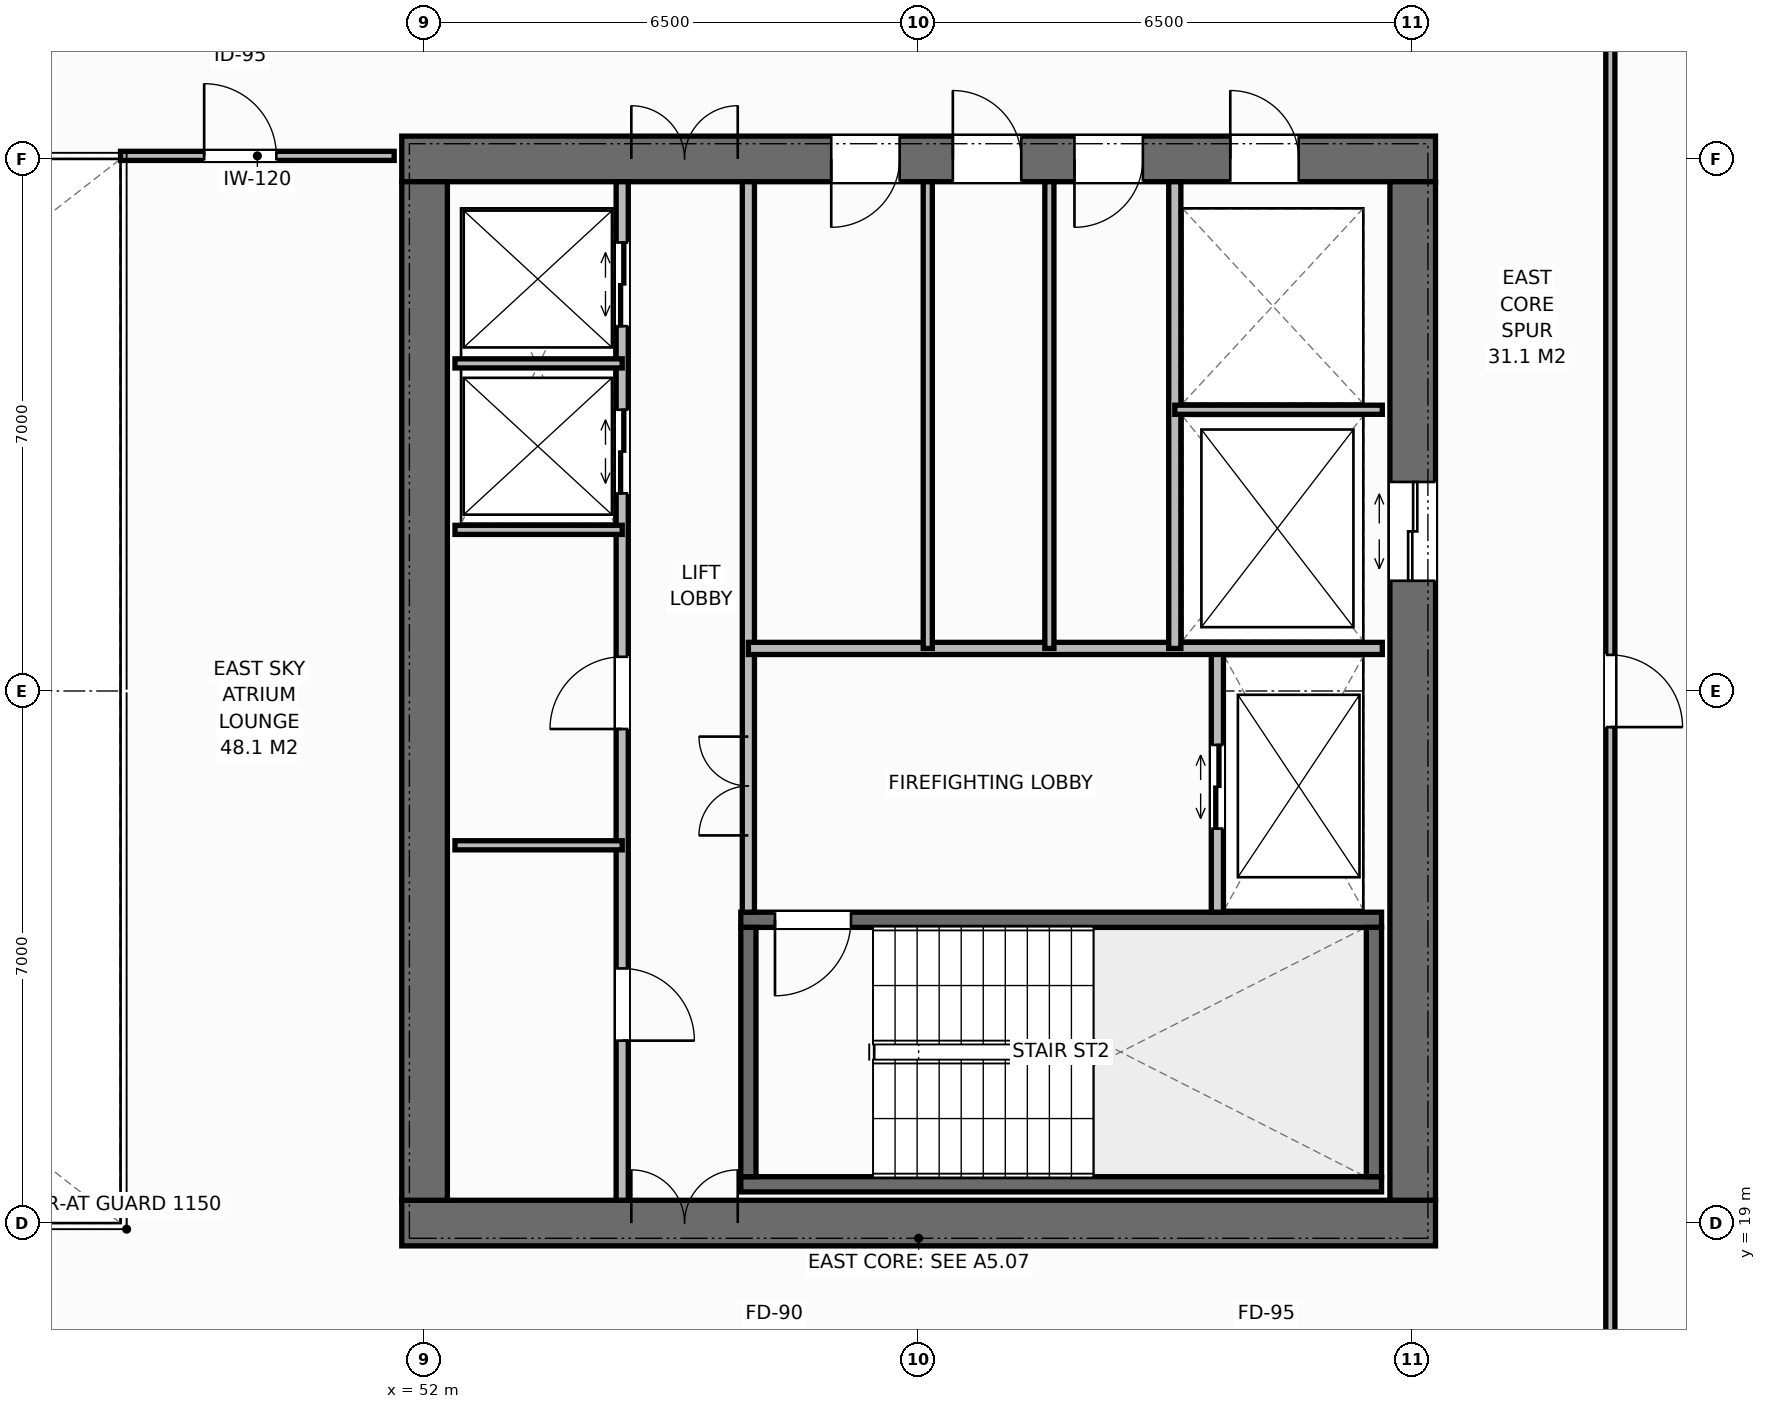
"""IFC4 building model, lengths in metres.
Left out: names, types, materials, properties, quantities, classifications, styles, units other than length and angle.
Written with IfcOpenShell. Run it as: python <this file> out.ifc"""

import sys

from ifc_helpers import new_model, si_unit, direction, frame, frame_2d, origin, place, context, subcontext, project, spatial, rectangle, extrude, element, fill, save


model = new_model("IFC4")
c1 = context("Model", 3, precision=1e-05, world=origin(), true_north=direction((0.0, 1.0)))
c2 = subcontext(c1, "Body", "Model", "MODEL_VIEW")
j1 = project(units=[si_unit("LENGTHUNIT", "METRE"), si_unit("PLANEANGLEUNIT", "RADIAN")], contexts=[c1])
p1 = place(None, origin())
s1 = spatial("IfcSite", under=j1, at=p1, CompositionType="ELEMENT")
p2 = place(p1, origin())
s2 = spatial("IfcBuilding", under=s1, at=p2, CompositionType="ELEMENT")
p3 = place(p2, frame((0.0, 0.0, 174.6)))
s3 = spatial("IfcBuildingStorey", under=s2, at=p3, CompositionType="ELEMENT", Elevation=174.6)
p4 = place(p3, frame((51.7, 19.0, 0.0), z_axis=(0.0, 0.0, 1.0), x_axis=(1.0, 0.0, 0.0)))
e1 = element("IfcWall", 1, at=p4, inside=s3, PredefinedType="SHEAR", context=c2, shape_type="SweptSolid", body=[
    extrude(rectangle(XDim=13.6, YDim=0.6, at=frame_2d((6.8, 0.0))), origin(), (0.0, 0.0, 1.0), 3.8),
])
p5 = place(p4, frame((3.02, 0.0, 0.0)))
e2 = element("IfcOpeningElement", 2, at=p5, cuts=e1, PredefinedType="OPENING", context=c2, shape_type="SweptSolid", body=[
    extrude(rectangle(XDim=1.4, YDim=2.2, at=frame_2d((0.7, 1.1))), frame((0.0, 0.31, 0.0), z_axis=(0.0, -1.0, 0.0), x_axis=(1.0, 0.0, 0.0)), (0.0, 0.0, 1.0), 0.62),
])
p6 = place(p3, frame((51.7, 33.0, 0.0), z_axis=(0.0, 0.0, 1.0), x_axis=(1.0, 0.0, 0.0)))
e3 = element("IfcWall", 3, at=p6, inside=s3, PredefinedType="SHEAR", context=c2, shape_type="SweptSolid", body=[
    extrude(rectangle(XDim=13.6, YDim=0.6, at=frame_2d((6.8, 0.0))), origin(), (0.0, 0.0, 1.0), 3.8),
])
p7 = place(p6, frame((3.02, 0.0, 0.0)))
e4 = element("IfcOpeningElement", 4, at=p7, cuts=e3, PredefinedType="OPENING", context=c2, shape_type="SweptSolid", body=[
    extrude(rectangle(XDim=1.4, YDim=2.2, at=frame_2d((0.7, 1.1))), frame((0.0, 0.31, 0.0), z_axis=(0.0, -1.0, 0.0), x_axis=(1.0, 0.0, 0.0)), (0.0, 0.0, 1.0), 0.62),
])
p8 = place(p6, frame((10.9, 0.0, 0.0)))
e5 = element("IfcOpeningElement", 5, at=p8, cuts=e3, PredefinedType="OPENING", context=c2, shape_type="SweptSolid", body=[
    extrude(rectangle(XDim=0.9, YDim=2.15, at=frame_2d((0.45, 1.075))), frame((0.0, 0.31, 0.0), z_axis=(0.0, -1.0, 0.0), x_axis=(1.0, 0.0, 0.0)), (0.0, 0.0, 1.0), 0.62),
])
p9 = place(p6, frame((5.65, 0.0, 0.0)))
e6 = element("IfcOpeningElement", 6, at=p9, cuts=e3, PredefinedType="OPENING", context=c2, shape_type="SweptSolid", body=[
    extrude(rectangle(XDim=0.9, YDim=2.15, at=frame_2d((0.45, 1.075))), frame((0.0, 0.31, 0.0), z_axis=(0.0, -1.0, 0.0), x_axis=(1.0, 0.0, 0.0)), (0.0, 0.0, 1.0), 0.62),
])
p10 = place(p6, frame((7.25, 0.0, 0.0)))
e7 = element("IfcOpeningElement", 7, at=p10, cuts=e3, PredefinedType="OPENING", context=c2, shape_type="SweptSolid", body=[
    extrude(rectangle(XDim=0.9, YDim=2.15, at=frame_2d((0.45, 1.075))), frame((0.0, 0.31, 0.0), z_axis=(0.0, -1.0, 0.0), x_axis=(1.0, 0.0, 0.0)), (0.0, 0.0, 1.0), 0.62),
])
p11 = place(p6, frame((8.85, 0.0, 0.0)))
e8 = element("IfcOpeningElement", 8, at=p11, cuts=e3, PredefinedType="OPENING", context=c2, shape_type="SweptSolid", body=[
    extrude(rectangle(XDim=0.9, YDim=2.15, at=frame_2d((0.45, 1.075))), frame((0.0, 0.31, 0.0), z_axis=(0.0, -1.0, 0.0), x_axis=(1.0, 0.0, 0.0)), (0.0, 0.0, 1.0), 0.62),
])
p12 = place(p3, frame((52.0, 19.3, 0.0), z_axis=(0.0, 0.0, 1.0), x_axis=(0.0, 1.0, 0.0)))
e9 = element("IfcWall", 9, at=p12, inside=s3, PredefinedType="SHEAR", context=c2, shape_type="SweptSolid", body=[
    extrude(rectangle(XDim=13.4, YDim=0.6, at=frame_2d((6.7, 0.0))), origin(), (0.0, 0.0, 1.0), 3.8),
])
p13 = place(p3, frame((65.0, 19.3, 0.0), z_axis=(0.0, 0.0, 1.0), x_axis=(0.0, 1.0, 0.0)))
e10 = element("IfcWall", 10, at=p13, inside=s3, PredefinedType="SHEAR", context=c2, shape_type="SweptSolid", body=[
    extrude(rectangle(XDim=13.4, YDim=0.6, at=frame_2d((6.7, 0.0))), origin(), (0.0, 0.0, 1.0), 3.8),
])
p14 = place(p13, frame((8.15, 0.0, 0.0)))
e11 = element("IfcOpeningElement", 11, at=p14, cuts=e10, PredefinedType="OPENING", context=c2, shape_type="SweptSolid", body=[
    extrude(rectangle(XDim=1.3, YDim=2.2, at=frame_2d((0.65, 1.1))), frame((0.0, 0.31, 0.0), z_axis=(0.0, -1.0, 0.0), x_axis=(1.0, 0.0, 0.0)), (0.0, 0.0, 1.0), 0.62),
])
p15 = place(p3, frame((56.16, 19.51, 0.0), z_axis=(0.0, 0.0, 1.0), x_axis=(1.0, 0.0, 0.0)))
e12 = element("IfcWall", 12, at=p15, inside=s3, PredefinedType="SHEAR", context=c2, shape_type="SweptSolid", body=[
    extrude(rectangle(XDim=8.43, YDim=0.2, at=frame_2d((4.215, 0.0))), origin(), (0.0, 0.0, 1.0), 3.8),
])
p16 = place(p3, frame((56.16, 22.99, 0.0), z_axis=(0.0, 0.0, 1.0), x_axis=(1.0, 0.0, 0.0)))
e13 = element("IfcWall", 13, at=p16, inside=s3, PredefinedType="SHEAR", context=c2, shape_type="SweptSolid", body=[
    extrude(rectangle(XDim=8.43, YDim=0.2, at=frame_2d((4.215, 0.0))), origin(), (0.0, 0.0, 1.0), 3.8),
])
p17 = place(p16, frame((0.45, 0.0, 0.0)))
e14 = element("IfcOpeningElement", 14, at=p17, cuts=e13, PredefinedType="OPENING", context=c2, shape_type="SweptSolid", body=[
    extrude(rectangle(XDim=1.0, YDim=2.15, at=frame_2d((0.5, 1.075))), frame((0.0, 0.11, 0.0), z_axis=(0.0, -1.0, 0.0), x_axis=(1.0, 0.0, 0.0)), (0.0, 0.0, 1.0), 0.22),
])
for number, where, z_axis, x_axis in (
    (15, (56.26, 19.61, 0.0), (0.0, 0.0, 1.0), (0.0, 1.0, 0.0)),
    (16, (64.49, 19.61, 0.0), (0.0, 0.0, 1.0), (0.0, 1.0, 0.0)),
):
    element("IfcWall", number, at=place(p3, frame(where, z_axis=z_axis, x_axis=x_axis)), inside=s3, PredefinedType="SHEAR", context=c2, shape_type="SweptSolid", body=[
        extrude(rectangle(XDim=3.28, YDim=0.2, at=frame_2d((1.64, 0.0))), origin(), (0.0, 0.0, 1.0), 3.8),
    ])
p18 = place(p3, frame((54.6, 19.3, 0.0), z_axis=(0.0, 0.0, 1.0), x_axis=(0.0, 1.0, 0.0)))
e17 = element("IfcWall", 17, at=p18, inside=s3, PredefinedType="STANDARD", context=c2, shape_type="SweptSolid", body=[
    extrude(rectangle(XDim=13.4, YDim=0.16, at=frame_2d((6.7, 0.0))), origin(), (0.0, 0.0, 1.0), 3.572),
])
p19 = place(p18, frame((2.1, 0.0, 0.0)))
e18 = element("IfcOpeningElement", 18, at=p19, cuts=e17, PredefinedType="OPENING", context=c2, shape_type="SweptSolid", body=[
    extrude(rectangle(XDim=0.95, YDim=2.15, at=frame_2d((0.475, 1.075))), frame((0.0, 0.09, 0.0), z_axis=(0.0, -1.0, 0.0), x_axis=(1.0, 0.0, 0.0)), (0.0, 0.0, 1.0), 0.18),
])
p20 = place(p18, frame((6.2, 0.0, 0.0)))
e19 = element("IfcOpeningElement", 19, at=p20, cuts=e17, PredefinedType="OPENING", context=c2, shape_type="SweptSolid", body=[
    extrude(rectangle(XDim=0.95, YDim=2.15, at=frame_2d((0.475, 1.075))), frame((0.0, 0.09, 0.0), z_axis=(0.0, -1.0, 0.0), x_axis=(1.0, 0.0, 0.0)), (0.0, 0.0, 1.0), 0.18),
])
p21 = place(p18, frame((9.3, 0.0, 0.0)))
e20 = element("IfcOpeningElement", 20, at=p21, cuts=e17, PredefinedType="OPENING", context=c2, shape_type="SweptSolid", body=[
    extrude(rectangle(XDim=1.1, YDim=2.2, at=frame_2d((0.55, 1.1))), frame((0.0, 0.09, 0.0), z_axis=(0.0, -1.0, 0.0), x_axis=(1.0, 0.0, 0.0)), (0.0, 0.0, 1.0), 0.18),
])
p22 = place(p18, frame((11.5, 0.0, 0.0)))
e21 = element("IfcOpeningElement", 21, at=p22, cuts=e17, PredefinedType="OPENING", context=c2, shape_type="SweptSolid", body=[
    extrude(rectangle(XDim=1.1, YDim=2.2, at=frame_2d((0.55, 1.1))), frame((0.0, 0.09, 0.0), z_axis=(0.0, -1.0, 0.0), x_axis=(1.0, 0.0, 0.0)), (0.0, 0.0, 1.0), 0.18),
])
p23 = place(p3, frame((56.26, 23.09, 0.0), z_axis=(0.0, 0.0, 1.0), x_axis=(0.0, 1.0, 0.0)))
e22 = element("IfcWall", 22, at=p23, inside=s3, PredefinedType="STANDARD", context=c2, shape_type="SweptSolid", body=[
    extrude(rectangle(XDim=9.61, YDim=0.16, at=frame_2d((4.805, 0.0))), origin(), (0.0, 0.0, 1.0), 3.572),
])
p24 = place(p23, frame((1.01, 0.0, 0.0)))
e23 = element("IfcOpeningElement", 23, at=p24, cuts=e22, PredefinedType="OPENING", context=c2, shape_type="SweptSolid", body=[
    extrude(rectangle(XDim=1.3, YDim=2.2, at=frame_2d((0.65, 1.1))), frame((0.0, 0.09, 0.0), z_axis=(0.0, -1.0, 0.0), x_axis=(1.0, 0.0, 0.0)), (0.0, 0.0, 1.0), 0.18),
])
for number, where, z_axis, x_axis in (
    (24, (52.4, 23.97, 0.0), (0.0, 0.0, 1.0), (1.0, 0.0, 0.0)),
    (25, (52.4, 28.12, 0.0), (0.0, 0.0, 1.0), (1.0, 0.0, 0.0)),
    (26, (52.4, 30.31, 0.0), (0.0, 0.0, 1.0), (1.0, 0.0, 0.0)),
):
    element("IfcWall", number, at=place(p3, frame(where, z_axis=z_axis, x_axis=x_axis)), inside=s3, PredefinedType="PARTITIONING", context=c2, shape_type="SweptSolid", body=[
        extrude(rectangle(XDim=2.2, YDim=0.12, at=frame_2d((1.1, 0.0))), origin(), (0.0, 0.0, 1.0), 3.572),
    ])
p25 = place(p3, frame((62.43, 23.09, 0.0), z_axis=(0.0, 0.0, 1.0), x_axis=(0.0, 1.0, 0.0)))
e27 = element("IfcWall", 27, at=p25, inside=s3, PredefinedType="STANDARD", context=c2, shape_type="SweptSolid", body=[
    extrude(rectangle(XDim=3.47, YDim=0.16, at=frame_2d((1.735, 0.0))), origin(), (0.0, 0.0, 1.0), 3.572),
])
p26 = place(p25, frame((1.1, 0.0, 0.0)))
e28 = element("IfcOpeningElement", 28, at=p26, cuts=e27, PredefinedType="OPENING", context=c2, shape_type="SweptSolid", body=[
    extrude(rectangle(XDim=1.1, YDim=2.2, at=frame_2d((0.55, 1.1))), frame((0.0, 0.09, 0.0), z_axis=(0.0, -1.0, 0.0), x_axis=(1.0, 0.0, 0.0)), (0.0, 0.0, 1.0), 0.18),
])
p27 = place(p3, frame((56.26, 26.56, 0.0), z_axis=(0.0, 0.0, 1.0), x_axis=(1.0, 0.0, 0.0)))
e29 = element("IfcWall", 29, at=p27, inside=s3, PredefinedType="STANDARD", context=c2, shape_type="SweptSolid", body=[
    extrude(rectangle(XDim=8.34, YDim=0.16, at=frame_2d((4.17, 0.0))), origin(), (0.0, 0.0, 1.0), 3.572),
])
p28 = place(p3, frame((61.87, 26.56, 0.0), z_axis=(0.0, 0.0, 1.0), x_axis=(0.0, 1.0, 0.0)))
e30 = element("IfcWall", 30, at=p28, inside=s3, PredefinedType="STANDARD", context=c2, shape_type="SweptSolid", body=[
    extrude(rectangle(XDim=6.14, YDim=0.16, at=frame_2d((3.07, 0.0))), origin(), (0.0, 0.0, 1.0), 3.572),
])
p29 = place(p3, frame((61.87, 29.7, 0.0), z_axis=(0.0, 0.0, 1.0), x_axis=(1.0, 0.0, 0.0)))
e31 = element("IfcWall", 31, at=p29, inside=s3, PredefinedType="PARTITIONING", context=c2, shape_type="SweptSolid", body=[
    extrude(rectangle(XDim=2.73, YDim=0.12, at=frame_2d((1.365, 0.0))), origin(), (0.0, 0.0, 1.0), 3.572),
])
for number, where, z_axis, x_axis in (
    (32, (58.62, 26.56, 0.0), (0.0, 0.0, 1.0), (0.0, 1.0, 0.0)),
    (33, (60.22, 26.56, 0.0), (0.0, 0.0, 1.0), (0.0, 1.0, 0.0)),
):
    element("IfcWall", number, at=place(p3, frame(where, z_axis=z_axis, x_axis=x_axis)), inside=s3, PredefinedType="PARTITIONING", context=c2, shape_type="SweptSolid", body=[
        extrude(rectangle(XDim=6.14, YDim=0.12, at=frame_2d((3.07, 0.0))), origin(), (0.0, 0.0, 1.0), 3.572),
    ])
p30 = place(p3, frame((48.0, 33.04, 0.0), z_axis=(0.0, 0.0, 1.0), x_axis=(1.0, 0.0, 0.0)))
e34 = element("IfcWall", 34, at=p30, inside=s3, PredefinedType="PARTITIONING", context=c2, shape_type="SweptSolid", body=[
    extrude(rectangle(XDim=3.6, YDim=0.12, at=frame_2d((1.8, 0.0))), origin(), (0.0, 0.0, 1.0), 3.312),
])
p31 = place(p30, frame((1.1, 0.0, 0.0)))
e35 = element("IfcOpeningElement", 35, at=p31, cuts=e34, PredefinedType="OPENING", context=c2, shape_type="SweptSolid", body=[
    extrude(rectangle(XDim=0.95, YDim=2.15, at=frame_2d((0.475, 1.075))), frame((0.0, 0.07, 0.0), z_axis=(0.0, -1.0, 0.0), x_axis=(1.0, 0.0, 0.0)), (0.0, 0.0, 1.0), 0.14),
])
p32 = place(p3, frame((67.6, 16.5, 0.0), z_axis=(0.0, 0.0, 1.0), x_axis=(0.0, 1.0, 0.0)))
e36 = element("IfcWall", 36, at=p32, inside=s3, PredefinedType="PARTITIONING", context=c2, shape_type="SweptSolid", body=[
    extrude(rectangle(XDim=19.0, YDim=0.12, at=frame_2d((9.5, 0.0))), origin(), (0.0, 0.0, 1.0), 3.572),
])
p33 = place(p32, frame((9.025, 0.0, 0.0)))
e37 = element("IfcOpeningElement", 37, at=p33, cuts=e36, PredefinedType="OPENING", context=c2, shape_type="SweptSolid", body=[
    extrude(rectangle(XDim=0.95, YDim=2.15, at=frame_2d((0.475, 1.075))), frame((0.0, 0.07, 0.0), z_axis=(0.0, -1.0, 0.0), x_axis=(1.0, 0.0, 0.0)), (0.0, 0.0, 1.0), 0.14),
])
p34 = place(p5, origin())
e38 = element("IfcDoor", 38, at=p34, inside=s3, OperationType="DOUBLE_DOOR_SINGLE_SWING", PredefinedType="DOOR", context=c2, shape_type="SweptSolid", body=[
    extrude(rectangle(XDim=1.4, YDim=2.2, at=frame_2d((0.7, 1.1))), frame((0.0, 0.075, 0.0), z_axis=(0.0, -1.0, 0.0), x_axis=(1.0, 0.0, 0.0)), (0.0, 0.0, 1.0), 0.05),
])
fill(e2, e38)
p35 = place(p7, origin())
e39 = element("IfcDoor", 39, at=p35, inside=s3, OperationType="DOUBLE_DOOR_SINGLE_SWING", PredefinedType="DOOR", context=c2, shape_type="SweptSolid", body=[
    extrude(rectangle(XDim=1.4, YDim=2.2, at=frame_2d((0.7, 1.1))), frame((0.0, -0.025, 0.0), z_axis=(0.0, -1.0, 0.0), x_axis=(1.0, 0.0, 0.0)), (0.0, 0.0, 1.0), 0.05),
])
fill(e4, e39)
p36 = place(p19, origin())
e40 = element("IfcDoor", 40, at=p36, inside=s3, OperationType="SINGLE_SWING_RIGHT", PredefinedType="DOOR", context=c2, shape_type="SweptSolid", body=[
    extrude(rectangle(XDim=0.95, YDim=2.15, at=frame_2d((0.475, 1.075))), frame((0.0, 0.025, 0.0), z_axis=(0.0, -1.0, 0.0), x_axis=(1.0, 0.0, 0.0)), (0.0, 0.0, 1.0), 0.05),
])
fill(e18, e40)
p37 = place(p20, origin())
e41 = element("IfcDoor", 41, at=p37, inside=s3, OperationType="SINGLE_SWING_LEFT", PredefinedType="DOOR", context=c2, shape_type="SweptSolid", body=[
    extrude(rectangle(XDim=0.95, YDim=2.15, at=frame_2d((0.475, 1.075))), frame((0.0, 0.025, 0.0), z_axis=(0.0, -1.0, 0.0), x_axis=(1.0, 0.0, 0.0)), (0.0, 0.0, 1.0), 0.05),
])
fill(e19, e41)
p38 = place(p21, origin())
e42 = element("IfcDoor", 42, at=p38, inside=s3, OperationType="DOUBLE_DOOR_SLIDING", PredefinedType="DOOR", context=c2, shape_type="SweptSolid", body=[
    extrude(rectangle(XDim=1.1, YDim=2.2, at=frame_2d((0.55, 1.1))), frame((0.0, 0.025, 0.0), z_axis=(0.0, -1.0, 0.0), x_axis=(1.0, 0.0, 0.0)), (0.0, 0.0, 1.0), 0.05),
])
fill(e20, e42)
p39 = place(p22, origin())
e43 = element("IfcDoor", 43, at=p39, inside=s3, OperationType="DOUBLE_DOOR_SLIDING", PredefinedType="DOOR", context=c2, shape_type="SweptSolid", body=[
    extrude(rectangle(XDim=1.1, YDim=2.2, at=frame_2d((0.55, 1.1))), frame((0.0, 0.025, 0.0), z_axis=(0.0, -1.0, 0.0), x_axis=(1.0, 0.0, 0.0)), (0.0, 0.0, 1.0), 0.05),
])
fill(e21, e43)
p40 = place(p17, origin())
e44 = element("IfcDoor", 44, at=p40, inside=s3, OperationType="SINGLE_SWING_RIGHT", PredefinedType="DOOR", context=c2, shape_type="SweptSolid", body=[
    extrude(rectangle(XDim=1.0, YDim=2.15, at=frame_2d((0.5, 1.075))), frame((0.0, 0.025, 0.0), z_axis=(0.0, -1.0, 0.0), x_axis=(1.0, 0.0, 0.0)), (0.0, 0.0, 1.0), 0.05),
])
fill(e14, e44)
p41 = place(p26, origin())
e45 = element("IfcDoor", 45, at=p41, inside=s3, OperationType="DOUBLE_DOOR_SLIDING", PredefinedType="DOOR", context=c2, shape_type="SweptSolid", body=[
    extrude(rectangle(XDim=1.1, YDim=2.2, at=frame_2d((0.55, 1.1))), frame((0.0, 0.025, 0.0), z_axis=(0.0, -1.0, 0.0), x_axis=(1.0, 0.0, 0.0)), (0.0, 0.0, 1.0), 0.05),
])
fill(e28, e45)
p42 = place(p24, origin())
e46 = element("IfcDoor", 46, at=p42, inside=s3, OperationType="DOUBLE_DOOR_SINGLE_SWING", PredefinedType="DOOR", context=c2, shape_type="SweptSolid", body=[
    extrude(rectangle(XDim=1.3, YDim=2.2, at=frame_2d((0.65, 1.1))), frame((0.0, 0.025, 0.0), z_axis=(0.0, -1.0, 0.0), x_axis=(1.0, 0.0, 0.0)), (0.0, 0.0, 1.0), 0.05),
])
fill(e23, e46)
p43 = place(p14, origin())
e47 = element("IfcDoor", 47, at=p43, inside=s3, OperationType="DOUBLE_DOOR_SLIDING", PredefinedType="DOOR", context=c2, shape_type="SweptSolid", body=[
    extrude(rectangle(XDim=1.3, YDim=2.2, at=frame_2d((0.65, 1.1))), frame((0.0, 0.025, 0.0), z_axis=(0.0, -1.0, 0.0), x_axis=(1.0, 0.0, 0.0)), (0.0, 0.0, 1.0), 0.05),
])
fill(e11, e47)
p44 = place(p8, origin())
e48 = element("IfcDoor", 48, at=p44, inside=s3, OperationType="SINGLE_SWING_LEFT", PredefinedType="DOOR", context=c2, shape_type="SweptSolid", body=[
    extrude(rectangle(XDim=0.9, YDim=2.15, at=frame_2d((0.45, 1.075))), frame((0.0, -0.025, 0.0), z_axis=(0.0, -1.0, 0.0), x_axis=(1.0, 0.0, 0.0)), (0.0, 0.0, 1.0), 0.05),
])
fill(e5, e48)
p45 = place(p9, origin())
e49 = element("IfcDoor", 49, at=p45, inside=s3, OperationType="SINGLE_SWING_RIGHT", PredefinedType="DOOR", context=c2, shape_type="SweptSolid", body=[
    extrude(rectangle(XDim=0.9, YDim=2.15, at=frame_2d((0.45, 1.075))), frame((0.0, -0.025, 0.0), z_axis=(0.0, -1.0, 0.0), x_axis=(1.0, 0.0, 0.0)), (0.0, 0.0, 1.0), 0.05),
])
fill(e6, e49)
p46 = place(p10, origin())
e50 = element("IfcDoor", 50, at=p46, inside=s3, OperationType="SINGLE_SWING_LEFT", PredefinedType="DOOR", context=c2, shape_type="SweptSolid", body=[
    extrude(rectangle(XDim=0.9, YDim=2.15, at=frame_2d((0.45, 1.075))), frame((0.0, -0.025, 0.0), z_axis=(0.0, -1.0, 0.0), x_axis=(1.0, 0.0, 0.0)), (0.0, 0.0, 1.0), 0.05),
])
fill(e7, e50)
p47 = place(p11, origin())
e51 = element("IfcDoor", 51, at=p47, inside=s3, OperationType="SINGLE_SWING_RIGHT", PredefinedType="DOOR", context=c2, shape_type="SweptSolid", body=[
    extrude(rectangle(XDim=0.9, YDim=2.15, at=frame_2d((0.45, 1.075))), frame((0.0, -0.025, 0.0), z_axis=(0.0, -1.0, 0.0), x_axis=(1.0, 0.0, 0.0)), (0.0, 0.0, 1.0), 0.05),
])
fill(e8, e51)
p48 = place(p31, origin())
e52 = element("IfcDoor", 52, at=p48, inside=s3, OperationType="SINGLE_SWING_LEFT", PredefinedType="DOOR", context=c2, shape_type="SweptSolid", body=[
    extrude(rectangle(XDim=0.95, YDim=2.15, at=frame_2d((0.475, 1.075))), frame((0.0, 0.025, 0.0), z_axis=(0.0, -1.0, 0.0), x_axis=(1.0, 0.0, 0.0)), (0.0, 0.0, 1.0), 0.05),
])
fill(e35, e52)
p49 = place(p33, origin())
e53 = element("IfcDoor", 53, at=p49, inside=s3, OperationType="SINGLE_SWING_RIGHT", PredefinedType="DOOR", context=c2, shape_type="SweptSolid", body=[
    extrude(rectangle(XDim=0.95, YDim=2.15, at=frame_2d((0.475, 1.075))), frame((0.0, 0.025, 0.0), z_axis=(0.0, -1.0, 0.0), x_axis=(1.0, 0.0, 0.0)), (0.0, 0.0, 1.0), 0.05),
])
fill(e37, e53)
save(model, sys.argv[1])
